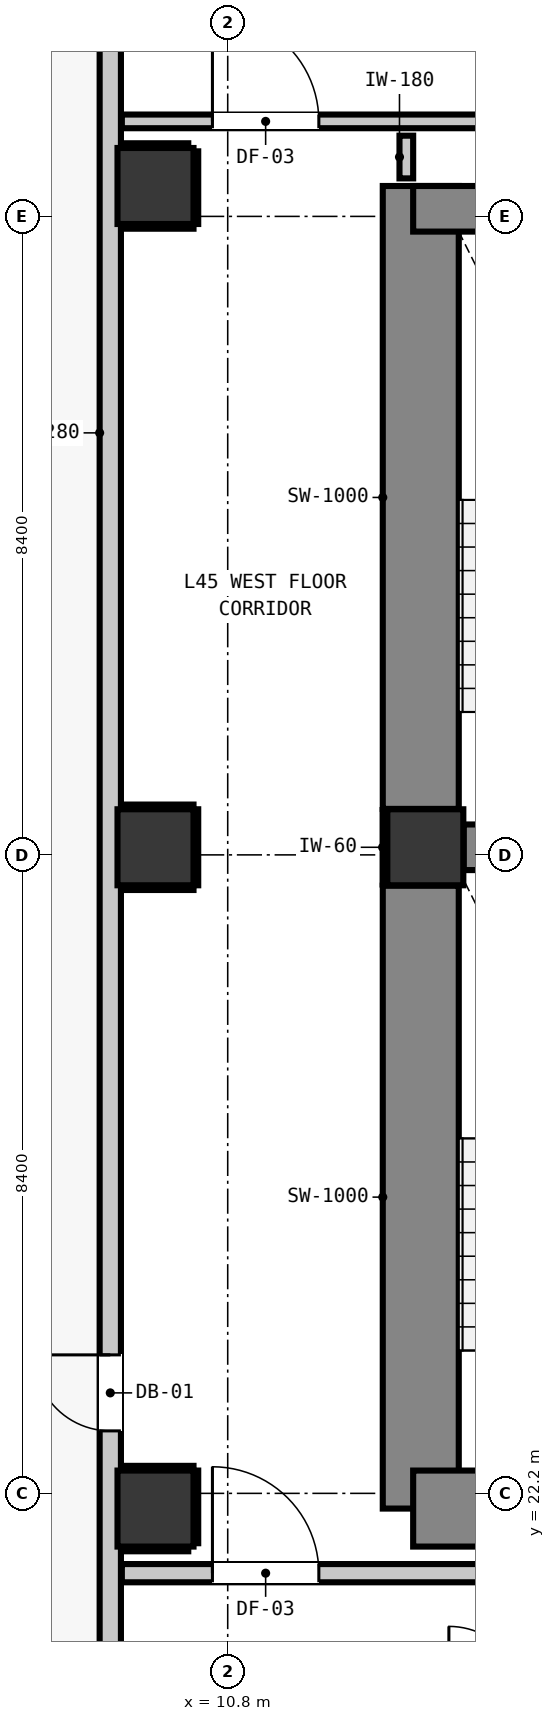
"""IFC4 building model, lengths in metres.
Left out: names, types, materials, properties, quantities, classifications, styles, units other than length and angle.
Written with IfcOpenShell. Run it as: python <this file> out.ifc"""

import sys

from ifc_helpers import new_model, si_unit, direction, frame, frame_2d, origin, origin_2d, place, context, subcontext, project, spatial, rectangle, extrude, element, fill, save


model = new_model("IFC4")
c1 = context("Model", 3, precision=1e-05, world=origin(), true_north=direction((0.0, 1.0)))
c2 = subcontext(c1, "Body", "Model", "MODEL_VIEW")
j1 = project(units=[si_unit("LENGTHUNIT", "METRE"), si_unit("PLANEANGLEUNIT", "RADIAN")], contexts=[c1])
p1 = place(None, origin())
s1 = spatial("IfcSite", under=j1, at=p1, CompositionType="ELEMENT")
p2 = place(p1, origin())
s2 = spatial("IfcBuilding", under=s1, at=p2, CompositionType="ELEMENT")
p3 = place(p2, frame((0.0, 0.0, 155.88)))
s3 = spatial("IfcBuildingStorey", under=s2, at=p3, CompositionType="ELEMENT", Elevation=155.88)
p4 = place(p3, frame((13.4, 30.7, 0.0), z_axis=(0.0, 0.0, 1.0), x_axis=(1.0, 0.0, 0.0)))
e1 = element("IfcColumn", 1, at=p4, inside=s3, PredefinedType="COLUMN", context=c2, shape_type="SweptSolid", body=[
    extrude(rectangle(XDim=1.0, YDim=1.0, at=origin_2d()), origin(), (0.0, 0.0, 1.0), 3.32),
])
p5 = place(p3, frame((13.34, 22.0, 0.0), z_axis=(0.0, 0.0, 1.0), x_axis=(0.0, 1.0, 0.0)))
e2 = element("IfcWall", 2, at=p5, inside=s3, PredefinedType="SHEAR", context=c2, shape_type="SweptSolid", body=[
    extrude(rectangle(XDim=8.195, YDim=1.0, at=frame_2d((4.098, 0.0))), origin(), (0.0, 0.0, 1.0), 3.32),
])
p6 = place(p3, frame((13.34, 31.205, 0.0), z_axis=(0.0, 0.0, 1.0), x_axis=(0.0, 1.0, 0.0)))
e3 = element("IfcWall", 3, at=p6, inside=s3, PredefinedType="SHEAR", context=c2, shape_type="SweptSolid", body=[
    extrude(rectangle(XDim=8.195, YDim=1.0, at=frame_2d((4.097, 0.0))), origin(), (0.0, 0.0, 1.0), 3.32),
])
p7 = place(p3, frame((13.24, 22.0, 0.0), z_axis=(0.0, 0.0, 1.0), x_axis=(1.0, 0.0, 0.0)))
e4 = element("IfcWall", 4, at=p7, inside=s3, PredefinedType="SHEAR", context=c2, shape_type="SweptSolid", body=[
    extrude(rectangle(XDim=4.08, YDim=1.0, at=frame_2d((2.04, 0.0))), origin(), (0.0, 0.0, 1.0), 3.32),
])
p8 = place(p3, frame((13.24, 39.1, 0.0), z_axis=(0.0, 0.0, 1.0), x_axis=(1.0, 0.0, 0.0)))
e5 = element("IfcWall", 5, at=p8, inside=s3, PredefinedType="SHEAR", context=c2, shape_type="SweptSolid", body=[
    extrude(rectangle(XDim=4.08, YDim=0.6, at=frame_2d((2.04, 0.0))), origin(), (0.0, 0.0, 1.0), 3.32),
])
p9 = place(p3, frame((13.905, 30.7, 0.0), z_axis=(0.0, 0.0, 1.0), x_axis=(1.0, 0.0, 0.0)))
e6 = element("IfcWall", 6, at=p9, inside=s3, PredefinedType="SHEAR", context=c2, shape_type="SweptSolid", body=[
    extrude(rectangle(XDim=3.415, YDim=0.6, at=frame_2d((1.708, 0.0))), origin(), (0.0, 0.0, 1.0), 3.32),
])
for number, where, z_axis, x_axis in (
    (7, (9.85, 22.0, 0.0), (0.0, 0.0, 1.0), (1.0, 0.0, 0.0)),
    (8, (9.85, 30.7, 0.0), (0.0, 0.0, 1.0), (1.0, 0.0, 0.0)),
    (9, (9.85, 39.4, 0.0), (0.0, 0.0, 1.0), (1.0, 0.0, 0.0)),
):
    element("IfcColumn", number, at=place(p3, frame(where, z_axis=z_axis, x_axis=x_axis)), inside=s3, PredefinedType="COLUMN", context=c2, shape_type="SweptSolid", body=[
        extrude(rectangle(XDim=1.0, YDim=1.0, at=origin_2d()), origin(), (0.0, 0.0, 1.0), 3.32),
    ])
p10 = place(p3, frame((9.255, 17.555, 0.0), z_axis=(0.0, 0.0, 1.0), x_axis=(0.0, 1.0, 0.0)))
e10 = element("IfcWall", 10, at=p10, inside=s3, PredefinedType="STANDARD", context=c2, shape_type="SweptSolid", body=[
    extrude(rectangle(XDim=32.29, YDim=0.28, at=frame_2d((16.145, 0.0))), origin(), (0.0, 0.0, 1.0), 3.08),
])
p11 = place(p10, frame((5.467, 0.0, 0.0)))
e11 = element("IfcOpeningElement", 11, at=p11, cuts=e10, PredefinedType="OPENING", context=c2, shape_type="SweptSolid", body=[
    extrude(rectangle(XDim=1.0, YDim=2.15, at=frame_2d((0.5, 1.075))), frame((0.0, 0.15, 0.0), z_axis=(0.0, -1.0, 0.0), x_axis=(1.0, 0.0, 0.0)), (0.0, 0.0, 1.0), 0.3),
])
p12 = place(p10, frame((30.727, 0.0, 0.85)))
e12 = element("IfcOpeningElement", 12, at=p12, cuts=e10, PredefinedType="OPENING", context=c2, shape_type="SweptSolid", body=[
    extrude(rectangle(XDim=1.1, YDim=2.05, at=frame_2d((0.55, 1.025))), frame((0.0, 0.15, 0.0), z_axis=(0.0, -1.0, 0.0), x_axis=(1.0, 0.0, 0.0)), (0.0, 0.0, 1.0), 0.3),
])
p13 = place(p3, frame((9.407, 21.15, 0.0), z_axis=(0.0, 0.0, 1.0), x_axis=(1.0, 0.0, 0.0)))
e13 = element("IfcWall", 13, at=p13, inside=s3, PredefinedType="PARTITIONING", context=c2, shape_type="SweptSolid", body=[
    extrude(rectangle(XDim=27.532, YDim=0.24, at=frame_2d((13.766, 0.0))), origin(), (0.0, 0.0, 1.0), 3.08),
])
p14 = place(p13, frame((8.803, 0.0, 0.0)))
e14 = element("IfcOpeningElement", 14, at=p14, cuts=e13, PredefinedType="OPENING", context=c2, shape_type="SweptSolid", body=[
    extrude(rectangle(XDim=1.1, YDim=2.15, at=frame_2d((0.55, 1.075))), frame((0.0, 0.13, 0.0), z_axis=(0.0, -1.0, 0.0), x_axis=(1.0, 0.0, 0.0)), (0.0, 0.0, 1.0), 0.26),
])
p15 = place(p13, frame((1.192, 0.0, 0.0)))
e15 = element("IfcOpeningElement", 15, at=p15, cuts=e13, PredefinedType="OPENING", context=c2, shape_type="SweptSolid", body=[
    extrude(rectangle(XDim=1.4, YDim=2.15, at=frame_2d((0.7, 1.075))), frame((0.0, 0.13, 0.0), z_axis=(0.0, -1.0, 0.0), x_axis=(1.0, 0.0, 0.0)), (0.0, 0.0, 1.0), 0.26),
])
p16 = place(p3, frame((9.407, 40.25, 0.0), z_axis=(0.0, 0.0, 1.0), x_axis=(1.0, 0.0, 0.0)))
e16 = element("IfcWall", 16, at=p16, inside=s3, PredefinedType="PARTITIONING", context=c2, shape_type="SweptSolid", body=[
    extrude(rectangle(XDim=39.386, YDim=0.18, at=frame_2d((19.693, 0.0))), origin(), (0.0, 0.0, 1.0), 3.08),
])
p17 = place(p16, frame((8.028, 0.0, 0.0)))
e17 = element("IfcOpeningElement", 17, at=p17, cuts=e16, PredefinedType="OPENING", context=c2, shape_type="SweptSolid", body=[
    extrude(rectangle(XDim=1.4, YDim=2.15, at=frame_2d((0.7, 1.075))), frame((0.0, 0.1, 0.0), z_axis=(0.0, -1.0, 0.0), x_axis=(1.0, 0.0, 0.0)), (0.0, 0.0, 1.0), 0.2),
])
p18 = place(p16, frame((1.192, 0.0, 0.0)))
e18 = element("IfcOpeningElement", 18, at=p18, cuts=e16, PredefinedType="OPENING", context=c2, shape_type="SweptSolid", body=[
    extrude(rectangle(XDim=1.4, YDim=2.15, at=frame_2d((0.7, 1.075))), frame((0.0, 0.1, 0.0), z_axis=(0.0, -1.0, 0.0), x_axis=(1.0, 0.0, 0.0)), (0.0, 0.0, 1.0), 0.2),
])
p19 = place(p16, frame((28.643, 0.0, 0.0)))
e19 = element("IfcOpeningElement", 19, at=p19, cuts=e16, PredefinedType="OPENING", context=c2, shape_type="SweptSolid", body=[
    extrude(rectangle(XDim=1.4, YDim=2.15, at=frame_2d((0.7, 1.075))), frame((0.0, 0.1, 0.0), z_axis=(0.0, -1.0, 0.0), x_axis=(1.0, 0.0, 0.0)), (0.0, 0.0, 1.0), 0.2),
])
p20 = place(p3, frame((13.15, 39.5, 0.0), z_axis=(0.0, 0.0, 1.0), x_axis=(0.0, 1.0, 0.0)))
e20 = element("IfcWall", 20, at=p20, inside=s3, PredefinedType="PARTITIONING", context=c2, shape_type="SweptSolid", body=[
    extrude(rectangle(XDim=0.562, YDim=0.18, at=frame_2d((0.281, 0.0))), origin(), (0.0, 0.0, 1.0), 2.315),
])
p21 = place(p3, frame((12.868, 30.21, 0.0), z_axis=(0.0, 0.0, 1.0), x_axis=(0.0, 1.0, 0.0)))
e21 = element("IfcWall", 21, at=p21, inside=s3, PredefinedType="PARTITIONING", context=c2, shape_type="SweptSolid", body=[
    extrude(rectangle(XDim=0.98, YDim=0.06, at=frame_2d((0.49, 0.0))), origin(), (0.0, 0.0, 1.0), 1.45),
])
p22 = place(p3, frame((9.41, 21.468, 0.0), z_axis=(0.0, 0.0, 1.0), x_axis=(1.0, 0.0, 0.0)))
e22 = element("IfcWall", 22, at=p22, inside=s3, PredefinedType="PARTITIONING", context=c2, shape_type="SweptSolid", body=[
    extrude(rectangle(XDim=0.871, YDim=0.06, at=frame_2d((0.436, 0.0))), origin(), (0.0, 0.0, 1.0), 1.45),
])
p23 = place(p3, frame((9.41, 22.532, 0.0), z_axis=(0.0, 0.0, 1.0), x_axis=(1.0, 0.0, 0.0)))
e23 = element("IfcWall", 23, at=p23, inside=s3, PredefinedType="PARTITIONING", context=c2, shape_type="SweptSolid", body=[
    extrude(rectangle(XDim=0.94, YDim=0.06, at=frame_2d((0.47, 0.0))), origin(), (0.0, 0.0, 1.0), 1.45),
])
p24 = place(p3, frame((10.382, 21.544, 0.0), z_axis=(0.0, 0.0, 1.0), x_axis=(0.0, 1.0, 0.0)))
e24 = element("IfcWall", 24, at=p24, inside=s3, PredefinedType="PARTITIONING", context=c2, shape_type="SweptSolid", body=[
    extrude(rectangle(XDim=0.956, YDim=0.06, at=frame_2d((0.478, 0.0))), origin(), (0.0, 0.0, 1.0), 1.45),
])
for number, where, z_axis, x_axis in (
    (25, (9.41, 30.168, 0.0), (0.0, 0.0, 1.0), (1.0, 0.0, 0.0)),
    (26, (9.41, 31.232, 0.0), (0.0, 0.0, 1.0), (1.0, 0.0, 0.0)),
):
    element("IfcWall", number, at=place(p3, frame(where, z_axis=z_axis, x_axis=x_axis)), inside=s3, PredefinedType="PARTITIONING", context=c2, shape_type="SweptSolid", body=[
        extrude(rectangle(XDim=0.94, YDim=0.06, at=frame_2d((0.47, 0.0))), origin(), (0.0, 0.0, 1.0), 1.45),
    ])
p25 = place(p3, frame((10.382, 30.2, 0.0), z_axis=(0.0, 0.0, 1.0), x_axis=(0.0, 1.0, 0.0)))
e27 = element("IfcWall", 27, at=p25, inside=s3, PredefinedType="PARTITIONING", context=c2, shape_type="SweptSolid", body=[
    extrude(rectangle(XDim=1.0, YDim=0.06, at=frame_2d((0.5, 0.0))), origin(), (0.0, 0.0, 1.0), 1.45),
])
p26 = place(p3, frame((9.41, 38.868, 0.0), z_axis=(0.0, 0.0, 1.0), x_axis=(1.0, 0.0, 0.0)))
e28 = element("IfcWall", 28, at=p26, inside=s3, PredefinedType="PARTITIONING", context=c2, shape_type="SweptSolid", body=[
    extrude(rectangle(XDim=0.94, YDim=0.06, at=frame_2d((0.47, 0.0))), origin(), (0.0, 0.0, 1.0), 1.45),
])
p27 = place(p3, frame((9.41, 39.932, 0.0), z_axis=(0.0, 0.0, 1.0), x_axis=(1.0, 0.0, 0.0)))
e29 = element("IfcWall", 29, at=p27, inside=s3, PredefinedType="PARTITIONING", context=c2, shape_type="SweptSolid", body=[
    extrude(rectangle(XDim=0.871, YDim=0.06, at=frame_2d((0.436, 0.0))), origin(), (0.0, 0.0, 1.0), 1.45),
])
p28 = place(p3, frame((10.382, 38.9, 0.0), z_axis=(0.0, 0.0, 1.0), x_axis=(0.0, 1.0, 0.0)))
e30 = element("IfcWall", 30, at=p28, inside=s3, PredefinedType="PARTITIONING", context=c2, shape_type="SweptSolid", body=[
    extrude(rectangle(XDim=0.956, YDim=0.06, at=frame_2d((0.478, 0.0))), origin(), (0.0, 0.0, 1.0), 1.45),
])
p29 = place(p11, origin())
e31 = element("IfcDoor", 31, at=p29, inside=s3, OperationType="SINGLE_SWING_RIGHT", PredefinedType="DOOR", context=c2, shape_type="SweptSolid", body=[
    extrude(rectangle(XDim=1.0, YDim=2.15, at=frame_2d((0.5, 1.075))), frame((0.0, 0.025, 0.0), z_axis=(0.0, -1.0, 0.0), x_axis=(1.0, 0.0, 0.0)), (0.0, 0.0, 1.0), 0.05),
])
fill(e11, e31)
p30 = place(p15, origin())
e32 = element("IfcDoor", 32, at=p30, inside=s3, OperationType="SINGLE_SWING_LEFT", PredefinedType="DOOR", context=c2, shape_type="SweptSolid", body=[
    extrude(rectangle(XDim=1.4, YDim=2.15, at=frame_2d((0.7, 1.075))), frame((0.0, 0.025, 0.0), z_axis=(0.0, -1.0, 0.0), x_axis=(1.0, 0.0, 0.0)), (0.0, 0.0, 1.0), 0.05),
])
fill(e15, e32)
p31 = place(p18, origin())
e33 = element("IfcDoor", 33, at=p31, inside=s3, OperationType="SINGLE_SWING_LEFT", PredefinedType="DOOR", context=c2, shape_type="SweptSolid", body=[
    extrude(rectangle(XDim=1.4, YDim=2.15, at=frame_2d((0.7, 1.075))), frame((0.0, 0.025, 0.0), z_axis=(0.0, -1.0, 0.0), x_axis=(1.0, 0.0, 0.0)), (0.0, 0.0, 1.0), 0.05),
])
fill(e18, e33)
save(model, sys.argv[1])
